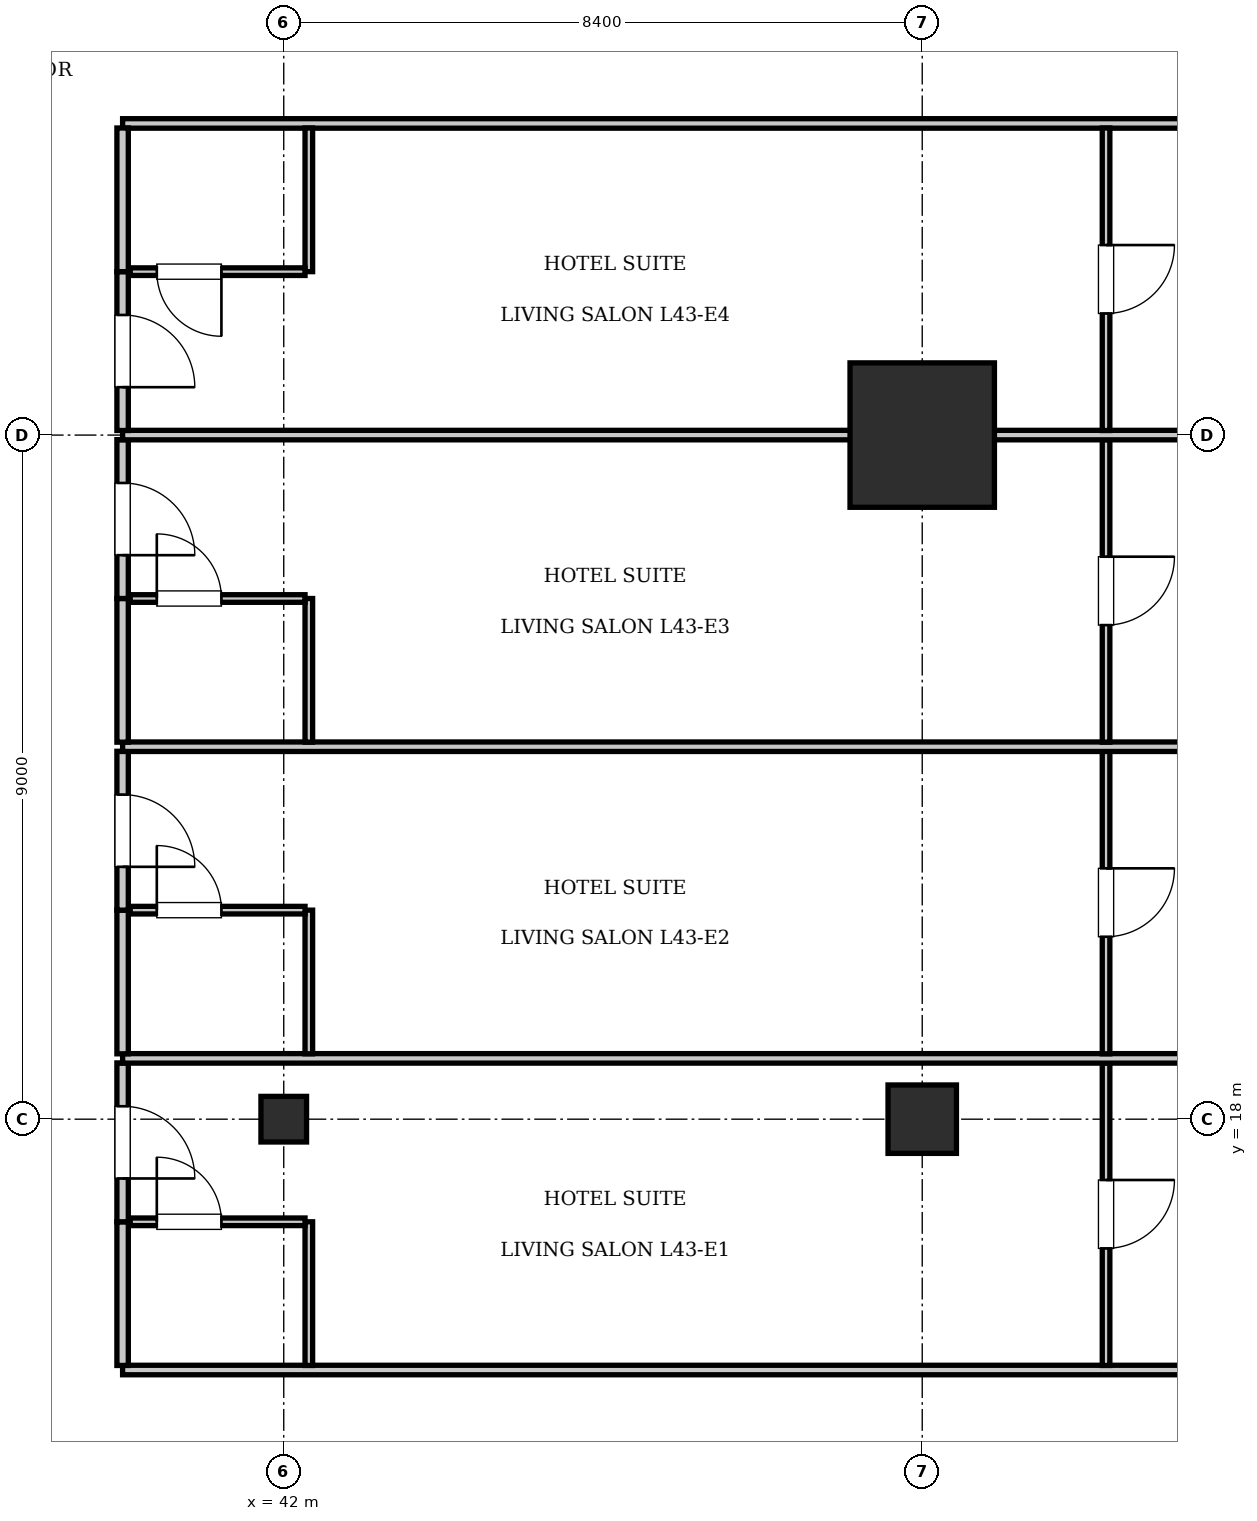
"""IFC4 building model, lengths in metres.
Left out: names, types, materials, properties, quantities, classifications, styles, units other than length and angle.
Written with IfcOpenShell. Run it as: python <this file> out.ifc"""

import sys

from ifc_helpers import new_model, si_unit, direction, frame, frame_2d, origin, origin_2d, place, context, subcontext, project, spatial, rectangle, i_section, extrude, element, fill, save


model = new_model("IFC4")
c1 = context("Model", 3, precision=1e-05, world=origin(), true_north=direction((0.0, 1.0)))
c2 = subcontext(c1, "Body", "Model", "MODEL_VIEW")
j1 = project(units=[si_unit("LENGTHUNIT", "METRE"), si_unit("PLANEANGLEUNIT", "RADIAN")], contexts=[c1])
p1 = place(None, origin())
s1 = spatial("IfcSite", under=j1, at=p1, CompositionType="ELEMENT")
p2 = place(p1, origin())
s2 = spatial("IfcBuilding", under=s1, at=p2, CompositionType="ELEMENT")
p3 = place(p2, frame((0.0, 0.0, 177.45)))
s3 = spatial("IfcBuildingStorey", under=s2, at=p3, CompositionType="ELEMENT", Elevation=177.45)
p4 = place(p3, frame((50.4, 27.0, 0.0), z_axis=(0.0, 0.0, 1.0), x_axis=(1.0, 0.0, 0.0)))
e1 = element("IfcColumn", 1, at=p4, inside=s3, PredefinedType="COLUMN", context=c2, shape_type="SweptSolid", body=[
    extrude(rectangle(XDim=1.9, YDim=1.9, at=origin_2d()), origin(), (0.0, 0.0, 1.0), 3.85),
])
p5 = place(p3, frame((50.4, 18.0, 0.0), z_axis=(0.0, 0.0, 1.0), x_axis=(1.0, 0.0, 0.0)))
e2 = element("IfcColumn", 2, at=p5, inside=s3, PredefinedType="COLUMN", context=c2, shape_type="SweptSolid", body=[
    extrude(rectangle(XDim=0.9, YDim=0.9, at=origin_2d()), origin(), (0.0, 0.0, 1.0), 3.85),
])
p6 = place(p3, frame((42.0, 18.0, 0.0), z_axis=(0.0, 0.0, 1.0), x_axis=(1.0, 0.0, 0.0)))
e3 = element("IfcColumn", 3, at=p6, inside=s3, PredefinedType="COLUMN", context=c2, shape_type="SweptSolid", body=[
    extrude(i_section(OverallWidth=0.6, OverallDepth=0.6, WebThickness=0.025, FlangeThickness=0.038, at=origin_2d()), origin(), (0.0, 0.0, 1.0), 3.85),
])
for number, where, z_axis, x_axis in (
    (4, (39.88, 14.7, 0.0), (0.0, 0.0, 1.0), (1.0, 0.0, 0.0)),
    (5, (39.88, 31.1, 0.0), (0.0, 0.0, 1.0), (1.0, 0.0, 0.0)),
):
    element("IfcWall", number, at=place(p3, frame(where, z_axis=z_axis, x_axis=x_axis)), inside=s3, PredefinedType="PARTITIONING", context=c2, shape_type="SweptSolid", body=[
        extrude(rectangle(XDim=22.52, YDim=0.125, at=frame_2d((11.26, 0.0))), origin(), (0.0, 0.0, 1.0), 3.61),
    ])
p7 = place(p3, frame((39.88, 14.76, 0.0), z_axis=(0.0, 0.0, 1.0), x_axis=(0.0, 1.0, 0.0)))
e6 = element("IfcWall", 6, at=p7, inside=s3, PredefinedType="PARTITIONING", context=c2, shape_type="SweptSolid", body=[
    extrude(rectangle(XDim=1.89, YDim=0.15, at=frame_2d((0.945, 0.0))), origin(), (0.0, 0.0, 1.0), 3.61),
])
p8 = place(p3, frame((39.88, 16.65, 0.0), z_axis=(0.0, 0.0, 1.0), x_axis=(0.0, 1.0, 0.0)))
e7 = element("IfcWall", 7, at=p8, inside=s3, PredefinedType="PARTITIONING", context=c2, shape_type="SweptSolid", body=[
    extrude(rectangle(XDim=2.09, YDim=0.15, at=frame_2d((1.045, 0.0))), origin(), (0.0, 0.0, 1.0), 3.61),
])
p9 = place(p8, frame((0.57, 0.0, 0.0)))
e8 = element("IfcOpeningElement", 8, at=p9, cuts=e7, PredefinedType="OPENING", context=c2, shape_type="SweptSolid", body=[
    extrude(rectangle(XDim=0.95, YDim=2.15, at=frame_2d((0.475, 1.075))), frame((0.0, 0.085, 0.0), z_axis=(0.0, -1.0, 0.0), x_axis=(1.0, 0.0, 0.0)), (0.0, 0.0, 1.0), 0.17),
])
p10 = place(p3, frame((42.33, 14.76, 0.0), z_axis=(0.0, 0.0, 1.0), x_axis=(0.0, 1.0, 0.0)))
e9 = element("IfcWall", 9, at=p10, inside=s3, PredefinedType="PARTITIONING", context=c2, shape_type="SweptSolid", body=[
    extrude(rectangle(XDim=1.89, YDim=0.1, at=frame_2d((0.945, 0.0))), origin(), (0.0, 0.0, 1.0), 3.61),
])
p11 = place(p3, frame((39.98, 16.65, 0.0), z_axis=(0.0, 0.0, 1.0), x_axis=(1.0, 0.0, 0.0)))
e10 = element("IfcWall", 10, at=p11, inside=s3, PredefinedType="PARTITIONING", context=c2, shape_type="SweptSolid", body=[
    extrude(rectangle(XDim=2.3, YDim=0.1, at=frame_2d((1.15, 0.0))), origin(), (0.0, 0.0, 1.0), 3.61),
])
p12 = place(p11, frame((0.35, 0.0, 0.0)))
e11 = element("IfcOpeningElement", 11, at=p12, cuts=e10, PredefinedType="OPENING", context=c2, shape_type="SweptSolid", body=[
    extrude(rectangle(XDim=0.85, YDim=2.1, at=frame_2d((0.425, 1.05))), frame((0.0, 0.06, 0.0), z_axis=(0.0, -1.0, 0.0), x_axis=(1.0, 0.0, 0.0)), (0.0, 0.0, 1.0), 0.12),
])
p13 = place(p3, frame((52.818, 14.76, 0.0), z_axis=(0.0, 0.0, 1.0), x_axis=(0.0, 1.0, 0.0)))
e12 = element("IfcWall", 12, at=p13, inside=s3, PredefinedType="PARTITIONING", context=c2, shape_type="SweptSolid", body=[
    extrude(rectangle(XDim=3.98, YDim=0.1, at=frame_2d((1.99, 0.0))), origin(), (0.0, 0.0, 1.0), 3.61),
])
p14 = place(p13, frame((1.54, 0.0, 0.0)))
e13 = element("IfcOpeningElement", 13, at=p14, cuts=e12, PredefinedType="OPENING", context=c2, shape_type="SweptSolid", body=[
    extrude(rectangle(XDim=0.9, YDim=2.1, at=frame_2d((0.45, 1.05))), frame((0.0, 0.06, 0.0), z_axis=(0.0, -1.0, 0.0), x_axis=(1.0, 0.0, 0.0)), (0.0, 0.0, 1.0), 0.12),
])
p15 = place(p3, frame((39.88, 18.8, 0.0), z_axis=(0.0, 0.0, 1.0), x_axis=(1.0, 0.0, 0.0)))
e14 = element("IfcWall", 14, at=p15, inside=s3, PredefinedType="PARTITIONING", context=c2, shape_type="SweptSolid", body=[
    extrude(rectangle(XDim=22.52, YDim=0.125, at=frame_2d((11.26, 0.0))), origin(), (0.0, 0.0, 1.0), 3.61),
])
p16 = place(p3, frame((39.88, 18.86, 0.0), z_axis=(0.0, 0.0, 1.0), x_axis=(0.0, 1.0, 0.0)))
e15 = element("IfcWall", 15, at=p16, inside=s3, PredefinedType="PARTITIONING", context=c2, shape_type="SweptSolid", body=[
    extrude(rectangle(XDim=1.89, YDim=0.15, at=frame_2d((0.945, 0.0))), origin(), (0.0, 0.0, 1.0), 3.61),
])
p17 = place(p3, frame((39.88, 20.75, 0.0), z_axis=(0.0, 0.0, 1.0), x_axis=(0.0, 1.0, 0.0)))
e16 = element("IfcWall", 16, at=p17, inside=s3, PredefinedType="PARTITIONING", context=c2, shape_type="SweptSolid", body=[
    extrude(rectangle(XDim=2.09, YDim=0.15, at=frame_2d((1.045, 0.0))), origin(), (0.0, 0.0, 1.0), 3.61),
])
p18 = place(p17, frame((0.57, 0.0, 0.0)))
e17 = element("IfcOpeningElement", 17, at=p18, cuts=e16, PredefinedType="OPENING", context=c2, shape_type="SweptSolid", body=[
    extrude(rectangle(XDim=0.95, YDim=2.15, at=frame_2d((0.475, 1.075))), frame((0.0, 0.085, 0.0), z_axis=(0.0, -1.0, 0.0), x_axis=(1.0, 0.0, 0.0)), (0.0, 0.0, 1.0), 0.17),
])
p19 = place(p3, frame((42.33, 18.86, 0.0), z_axis=(0.0, 0.0, 1.0), x_axis=(0.0, 1.0, 0.0)))
e18 = element("IfcWall", 18, at=p19, inside=s3, PredefinedType="PARTITIONING", context=c2, shape_type="SweptSolid", body=[
    extrude(rectangle(XDim=1.89, YDim=0.1, at=frame_2d((0.945, 0.0))), origin(), (0.0, 0.0, 1.0), 3.61),
])
p20 = place(p3, frame((39.98, 20.75, 0.0), z_axis=(0.0, 0.0, 1.0), x_axis=(1.0, 0.0, 0.0)))
e19 = element("IfcWall", 19, at=p20, inside=s3, PredefinedType="PARTITIONING", context=c2, shape_type="SweptSolid", body=[
    extrude(rectangle(XDim=2.3, YDim=0.1, at=frame_2d((1.15, 0.0))), origin(), (0.0, 0.0, 1.0), 3.61),
])
p21 = place(p20, frame((0.35, 0.0, 0.0)))
e20 = element("IfcOpeningElement", 20, at=p21, cuts=e19, PredefinedType="OPENING", context=c2, shape_type="SweptSolid", body=[
    extrude(rectangle(XDim=0.85, YDim=2.1, at=frame_2d((0.425, 1.05))), frame((0.0, 0.06, 0.0), z_axis=(0.0, -1.0, 0.0), x_axis=(1.0, 0.0, 0.0)), (0.0, 0.0, 1.0), 0.12),
])
p22 = place(p3, frame((52.818, 18.86, 0.0), z_axis=(0.0, 0.0, 1.0), x_axis=(0.0, 1.0, 0.0)))
e21 = element("IfcWall", 21, at=p22, inside=s3, PredefinedType="PARTITIONING", context=c2, shape_type="SweptSolid", body=[
    extrude(rectangle(XDim=3.98, YDim=0.1, at=frame_2d((1.99, 0.0))), origin(), (0.0, 0.0, 1.0), 3.61),
])
p23 = place(p22, frame((1.54, 0.0, 0.0)))
e22 = element("IfcOpeningElement", 22, at=p23, cuts=e21, PredefinedType="OPENING", context=c2, shape_type="SweptSolid", body=[
    extrude(rectangle(XDim=0.9, YDim=2.1, at=frame_2d((0.45, 1.05))), frame((0.0, 0.06, 0.0), z_axis=(0.0, -1.0, 0.0), x_axis=(1.0, 0.0, 0.0)), (0.0, 0.0, 1.0), 0.12),
])
p24 = place(p3, frame((39.88, 22.9, 0.0), z_axis=(0.0, 0.0, 1.0), x_axis=(1.0, 0.0, 0.0)))
e23 = element("IfcWall", 23, at=p24, inside=s3, PredefinedType="PARTITIONING", context=c2, shape_type="SweptSolid", body=[
    extrude(rectangle(XDim=22.52, YDim=0.125, at=frame_2d((11.26, 0.0))), origin(), (0.0, 0.0, 1.0), 3.61),
])
p25 = place(p3, frame((39.88, 22.96, 0.0), z_axis=(0.0, 0.0, 1.0), x_axis=(0.0, 1.0, 0.0)))
e24 = element("IfcWall", 24, at=p25, inside=s3, PredefinedType="PARTITIONING", context=c2, shape_type="SweptSolid", body=[
    extrude(rectangle(XDim=1.89, YDim=0.15, at=frame_2d((0.945, 0.0))), origin(), (0.0, 0.0, 1.0), 3.61),
])
p26 = place(p3, frame((39.88, 24.85, 0.0), z_axis=(0.0, 0.0, 1.0), x_axis=(0.0, 1.0, 0.0)))
e25 = element("IfcWall", 25, at=p26, inside=s3, PredefinedType="PARTITIONING", context=c2, shape_type="SweptSolid", body=[
    extrude(rectangle(XDim=2.09, YDim=0.15, at=frame_2d((1.045, 0.0))), origin(), (0.0, 0.0, 1.0), 3.61),
])
p27 = place(p26, frame((0.57, 0.0, 0.0)))
e26 = element("IfcOpeningElement", 26, at=p27, cuts=e25, PredefinedType="OPENING", context=c2, shape_type="SweptSolid", body=[
    extrude(rectangle(XDim=0.95, YDim=2.15, at=frame_2d((0.475, 1.075))), frame((0.0, 0.085, 0.0), z_axis=(0.0, -1.0, 0.0), x_axis=(1.0, 0.0, 0.0)), (0.0, 0.0, 1.0), 0.17),
])
p28 = place(p3, frame((42.33, 22.96, 0.0), z_axis=(0.0, 0.0, 1.0), x_axis=(0.0, 1.0, 0.0)))
e27 = element("IfcWall", 27, at=p28, inside=s3, PredefinedType="PARTITIONING", context=c2, shape_type="SweptSolid", body=[
    extrude(rectangle(XDim=1.89, YDim=0.1, at=frame_2d((0.945, 0.0))), origin(), (0.0, 0.0, 1.0), 3.61),
])
p29 = place(p3, frame((39.98, 24.85, 0.0), z_axis=(0.0, 0.0, 1.0), x_axis=(1.0, 0.0, 0.0)))
e28 = element("IfcWall", 28, at=p29, inside=s3, PredefinedType="PARTITIONING", context=c2, shape_type="SweptSolid", body=[
    extrude(rectangle(XDim=2.3, YDim=0.1, at=frame_2d((1.15, 0.0))), origin(), (0.0, 0.0, 1.0), 3.61),
])
p30 = place(p29, frame((0.35, 0.0, 0.0)))
e29 = element("IfcOpeningElement", 29, at=p30, cuts=e28, PredefinedType="OPENING", context=c2, shape_type="SweptSolid", body=[
    extrude(rectangle(XDim=0.85, YDim=2.1, at=frame_2d((0.425, 1.05))), frame((0.0, 0.06, 0.0), z_axis=(0.0, -1.0, 0.0), x_axis=(1.0, 0.0, 0.0)), (0.0, 0.0, 1.0), 0.12),
])
p31 = place(p3, frame((52.818, 22.96, 0.0), z_axis=(0.0, 0.0, 1.0), x_axis=(0.0, 1.0, 0.0)))
e30 = element("IfcWall", 30, at=p31, inside=s3, PredefinedType="PARTITIONING", context=c2, shape_type="SweptSolid", body=[
    extrude(rectangle(XDim=3.98, YDim=0.1, at=frame_2d((1.99, 0.0))), origin(), (0.0, 0.0, 1.0), 3.61),
])
p32 = place(p31, frame((1.54, 0.0, 0.0)))
e31 = element("IfcOpeningElement", 31, at=p32, cuts=e30, PredefinedType="OPENING", context=c2, shape_type="SweptSolid", body=[
    extrude(rectangle(XDim=0.9, YDim=2.1, at=frame_2d((0.45, 1.05))), frame((0.0, 0.06, 0.0), z_axis=(0.0, -1.0, 0.0), x_axis=(1.0, 0.0, 0.0)), (0.0, 0.0, 1.0), 0.12),
])
p33 = place(p3, frame((39.88, 27.0, 0.0), z_axis=(0.0, 0.0, 1.0), x_axis=(1.0, 0.0, 0.0)))
e32 = element("IfcWall", 32, at=p33, inside=s3, PredefinedType="PARTITIONING", context=c2, shape_type="SweptSolid", body=[
    extrude(rectangle(XDim=22.52, YDim=0.125, at=frame_2d((11.26, 0.0))), origin(), (0.0, 0.0, 1.0), 2.41),
])
p34 = place(p3, frame((39.88, 27.06, 0.0), z_axis=(0.0, 0.0, 1.0), x_axis=(0.0, 1.0, 0.0)))
e33 = element("IfcWall", 33, at=p34, inside=s3, PredefinedType="PARTITIONING", context=c2, shape_type="SweptSolid", body=[
    extrude(rectangle(XDim=2.09, YDim=0.15, at=frame_2d((1.045, 0.0))), origin(), (0.0, 0.0, 1.0), 3.61),
])
p35 = place(p34, frame((0.57, 0.0, 0.0)))
e34 = element("IfcOpeningElement", 34, at=p35, cuts=e33, PredefinedType="OPENING", context=c2, shape_type="SweptSolid", body=[
    extrude(rectangle(XDim=0.95, YDim=2.15, at=frame_2d((0.475, 1.075))), frame((0.0, 0.085, 0.0), z_axis=(0.0, -1.0, 0.0), x_axis=(1.0, 0.0, 0.0)), (0.0, 0.0, 1.0), 0.17),
])
p36 = place(p3, frame((39.88, 29.15, 0.0), z_axis=(0.0, 0.0, 1.0), x_axis=(0.0, 1.0, 0.0)))
e35 = element("IfcWall", 35, at=p36, inside=s3, PredefinedType="PARTITIONING", context=c2, shape_type="SweptSolid", body=[
    extrude(rectangle(XDim=1.89, YDim=0.15, at=frame_2d((0.945, 0.0))), origin(), (0.0, 0.0, 1.0), 3.61),
])
p37 = place(p3, frame((42.33, 29.15, 0.0), z_axis=(0.0, 0.0, 1.0), x_axis=(0.0, 1.0, 0.0)))
e36 = element("IfcWall", 36, at=p37, inside=s3, PredefinedType="PARTITIONING", context=c2, shape_type="SweptSolid", body=[
    extrude(rectangle(XDim=1.89, YDim=0.1, at=frame_2d((0.945, 0.0))), origin(), (0.0, 0.0, 1.0), 3.61),
])
p38 = place(p3, frame((39.98, 29.15, 0.0), z_axis=(0.0, 0.0, 1.0), x_axis=(1.0, 0.0, 0.0)))
e37 = element("IfcWall", 37, at=p38, inside=s3, PredefinedType="PARTITIONING", context=c2, shape_type="SweptSolid", body=[
    extrude(rectangle(XDim=2.3, YDim=0.1, at=frame_2d((1.15, 0.0))), origin(), (0.0, 0.0, 1.0), 3.61),
])
p39 = place(p38, frame((0.35, 0.0, 0.0)))
e38 = element("IfcOpeningElement", 38, at=p39, cuts=e37, PredefinedType="OPENING", context=c2, shape_type="SweptSolid", body=[
    extrude(rectangle(XDim=0.85, YDim=2.1, at=frame_2d((0.425, 1.05))), frame((0.0, 0.06, 0.0), z_axis=(0.0, -1.0, 0.0), x_axis=(1.0, 0.0, 0.0)), (0.0, 0.0, 1.0), 0.12),
])
p40 = place(p3, frame((52.818, 27.06, 0.0), z_axis=(0.0, 0.0, 1.0), x_axis=(0.0, 1.0, 0.0)))
e39 = element("IfcWall", 39, at=p40, inside=s3, PredefinedType="PARTITIONING", context=c2, shape_type="SweptSolid", body=[
    extrude(rectangle(XDim=3.98, YDim=0.1, at=frame_2d((1.99, 0.0))), origin(), (0.0, 0.0, 1.0), 3.61),
])
p41 = place(p40, frame((1.54, 0.0, 0.0)))
e40 = element("IfcOpeningElement", 40, at=p41, cuts=e39, PredefinedType="OPENING", context=c2, shape_type="SweptSolid", body=[
    extrude(rectangle(XDim=0.9, YDim=2.1, at=frame_2d((0.45, 1.05))), frame((0.0, 0.06, 0.0), z_axis=(0.0, -1.0, 0.0), x_axis=(1.0, 0.0, 0.0)), (0.0, 0.0, 1.0), 0.12),
])
p42 = place(p12, origin())
e41 = element("IfcDoor", 41, at=p42, inside=s3, OperationType="SINGLE_SWING_LEFT", PredefinedType="DOOR", context=c2, shape_type="SweptSolid", body=[
    extrude(rectangle(XDim=0.85, YDim=2.1, at=frame_2d((0.425, 1.05))), frame((0.0, 0.025, 0.0), z_axis=(0.0, -1.0, 0.0), x_axis=(1.0, 0.0, 0.0)), (0.0, 0.0, 1.0), 0.05),
])
fill(e11, e41)
p43 = place(p9, frame((0.95, 0.0, 0.0), z_axis=(0.0, 0.0, 1.0), x_axis=(-1.0, 0.0, 0.0)))
e42 = element("IfcDoor", 42, at=p43, inside=s3, OperationType="SINGLE_SWING_RIGHT", PredefinedType="DOOR", context=c2, shape_type="SweptSolid", body=[
    extrude(rectangle(XDim=0.95, YDim=2.15, at=frame_2d((0.475, 1.075))), frame((0.0, 0.025, 0.0), z_axis=(0.0, -1.0, 0.0), x_axis=(1.0, 0.0, 0.0)), (0.0, 0.0, 1.0), 0.05),
])
fill(e8, e42)
p44 = place(p14, frame((0.9, 0.0, 0.0), z_axis=(0.0, 0.0, 1.0), x_axis=(-1.0, 0.0, 0.0)))
e43 = element("IfcDoor", 43, at=p44, inside=s3, OperationType="SINGLE_SWING_LEFT", PredefinedType="DOOR", context=c2, shape_type="SweptSolid", body=[
    extrude(rectangle(XDim=0.9, YDim=2.1, at=frame_2d((0.45, 1.05))), frame((0.0, 0.025, 0.0), z_axis=(0.0, -1.0, 0.0), x_axis=(1.0, 0.0, 0.0)), (0.0, 0.0, 1.0), 0.05),
])
fill(e13, e43)
p45 = place(p21, origin())
e44 = element("IfcDoor", 44, at=p45, inside=s3, OperationType="SINGLE_SWING_LEFT", PredefinedType="DOOR", context=c2, shape_type="SweptSolid", body=[
    extrude(rectangle(XDim=0.85, YDim=2.1, at=frame_2d((0.425, 1.05))), frame((0.0, 0.025, 0.0), z_axis=(0.0, -1.0, 0.0), x_axis=(1.0, 0.0, 0.0)), (0.0, 0.0, 1.0), 0.05),
])
fill(e20, e44)
p46 = place(p18, frame((0.95, 0.0, 0.0), z_axis=(0.0, 0.0, 1.0), x_axis=(-1.0, 0.0, 0.0)))
e45 = element("IfcDoor", 45, at=p46, inside=s3, OperationType="SINGLE_SWING_RIGHT", PredefinedType="DOOR", context=c2, shape_type="SweptSolid", body=[
    extrude(rectangle(XDim=0.95, YDim=2.15, at=frame_2d((0.475, 1.075))), frame((0.0, 0.025, 0.0), z_axis=(0.0, -1.0, 0.0), x_axis=(1.0, 0.0, 0.0)), (0.0, 0.0, 1.0), 0.05),
])
fill(e17, e45)
p47 = place(p23, frame((0.9, 0.0, 0.0), z_axis=(0.0, 0.0, 1.0), x_axis=(-1.0, 0.0, 0.0)))
e46 = element("IfcDoor", 46, at=p47, inside=s3, OperationType="SINGLE_SWING_LEFT", PredefinedType="DOOR", context=c2, shape_type="SweptSolid", body=[
    extrude(rectangle(XDim=0.9, YDim=2.1, at=frame_2d((0.45, 1.05))), frame((0.0, 0.025, 0.0), z_axis=(0.0, -1.0, 0.0), x_axis=(1.0, 0.0, 0.0)), (0.0, 0.0, 1.0), 0.05),
])
fill(e22, e46)
p48 = place(p30, origin())
e47 = element("IfcDoor", 47, at=p48, inside=s3, OperationType="SINGLE_SWING_LEFT", PredefinedType="DOOR", context=c2, shape_type="SweptSolid", body=[
    extrude(rectangle(XDim=0.85, YDim=2.1, at=frame_2d((0.425, 1.05))), frame((0.0, 0.025, 0.0), z_axis=(0.0, -1.0, 0.0), x_axis=(1.0, 0.0, 0.0)), (0.0, 0.0, 1.0), 0.05),
])
fill(e29, e47)
p49 = place(p27, frame((0.95, 0.0, 0.0), z_axis=(0.0, 0.0, 1.0), x_axis=(-1.0, 0.0, 0.0)))
e48 = element("IfcDoor", 48, at=p49, inside=s3, OperationType="SINGLE_SWING_RIGHT", PredefinedType="DOOR", context=c2, shape_type="SweptSolid", body=[
    extrude(rectangle(XDim=0.95, YDim=2.15, at=frame_2d((0.475, 1.075))), frame((0.0, 0.025, 0.0), z_axis=(0.0, -1.0, 0.0), x_axis=(1.0, 0.0, 0.0)), (0.0, 0.0, 1.0), 0.05),
])
fill(e26, e48)
p50 = place(p32, frame((0.9, 0.0, 0.0), z_axis=(0.0, 0.0, 1.0), x_axis=(-1.0, 0.0, 0.0)))
e49 = element("IfcDoor", 49, at=p50, inside=s3, OperationType="SINGLE_SWING_LEFT", PredefinedType="DOOR", context=c2, shape_type="SweptSolid", body=[
    extrude(rectangle(XDim=0.9, YDim=2.1, at=frame_2d((0.45, 1.05))), frame((0.0, 0.025, 0.0), z_axis=(0.0, -1.0, 0.0), x_axis=(1.0, 0.0, 0.0)), (0.0, 0.0, 1.0), 0.05),
])
fill(e31, e49)
p51 = place(p39, frame((0.85, 0.0, 0.0), z_axis=(0.0, 0.0, 1.0), x_axis=(-1.0, 0.0, 0.0)))
e50 = element("IfcDoor", 50, at=p51, inside=s3, OperationType="SINGLE_SWING_LEFT", PredefinedType="DOOR", context=c2, shape_type="SweptSolid", body=[
    extrude(rectangle(XDim=0.85, YDim=2.1, at=frame_2d((0.425, 1.05))), frame((0.0, 0.025, 0.0), z_axis=(0.0, -1.0, 0.0), x_axis=(1.0, 0.0, 0.0)), (0.0, 0.0, 1.0), 0.05),
])
fill(e38, e50)
p52 = place(p35, frame((0.95, 0.0, 0.0), z_axis=(0.0, 0.0, 1.0), x_axis=(-1.0, 0.0, 0.0)))
e51 = element("IfcDoor", 51, at=p52, inside=s3, OperationType="SINGLE_SWING_RIGHT", PredefinedType="DOOR", context=c2, shape_type="SweptSolid", body=[
    extrude(rectangle(XDim=0.95, YDim=2.15, at=frame_2d((0.475, 1.075))), frame((0.0, 0.025, 0.0), z_axis=(0.0, -1.0, 0.0), x_axis=(1.0, 0.0, 0.0)), (0.0, 0.0, 1.0), 0.05),
])
fill(e34, e51)
p53 = place(p41, frame((0.9, 0.0, 0.0), z_axis=(0.0, 0.0, 1.0), x_axis=(-1.0, 0.0, 0.0)))
e52 = element("IfcDoor", 52, at=p53, inside=s3, OperationType="SINGLE_SWING_LEFT", PredefinedType="DOOR", context=c2, shape_type="SweptSolid", body=[
    extrude(rectangle(XDim=0.9, YDim=2.1, at=frame_2d((0.45, 1.05))), frame((0.0, 0.025, 0.0), z_axis=(0.0, -1.0, 0.0), x_axis=(1.0, 0.0, 0.0)), (0.0, 0.0, 1.0), 0.05),
])
fill(e40, e52)
save(model, sys.argv[1])
